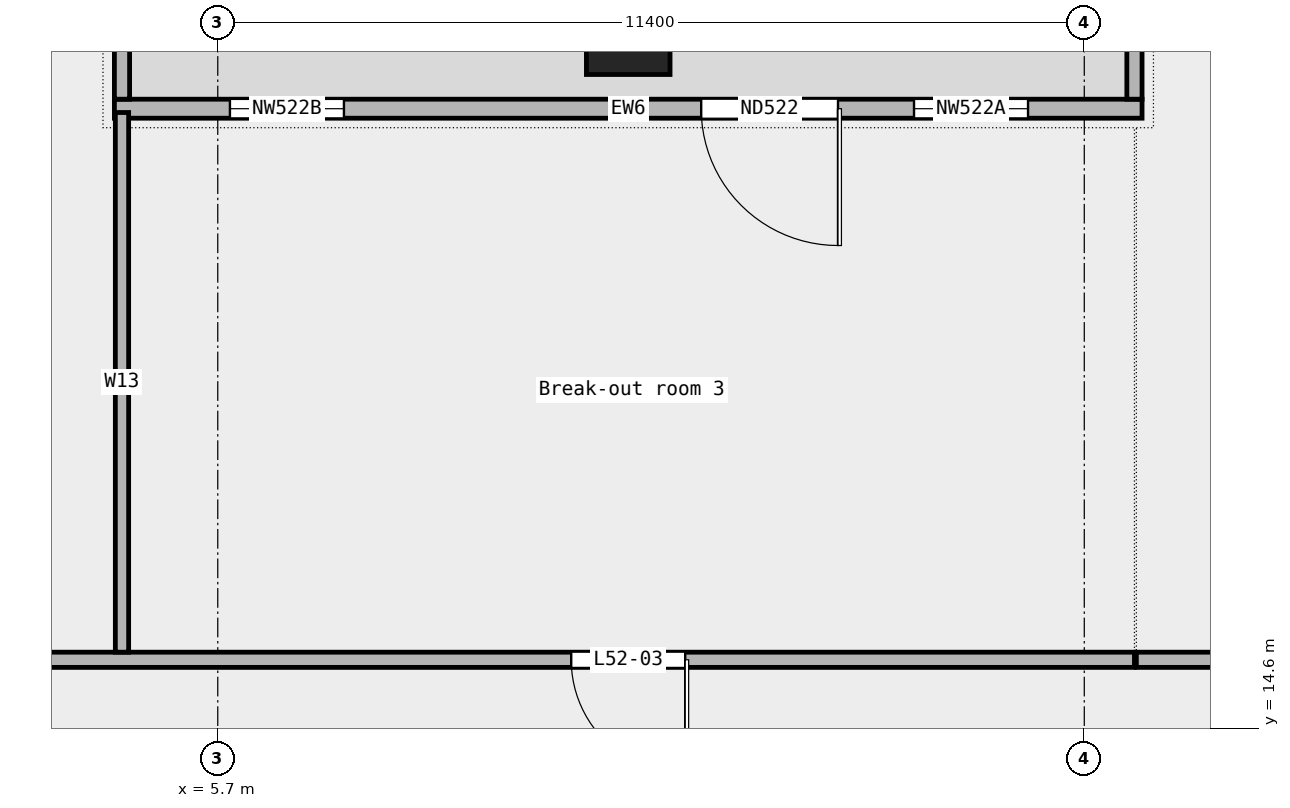
"""IFC4 building model, lengths in metres.
Left out: names, types, materials, properties, quantities, classifications, styles, units other than length and angle.
Written with IfcOpenShell. Run it as: python <this file> out.ifc"""

import sys

from ifc_helpers import new_model, si_unit, direction, frame, frame_2d, origin, origin_2d, place, context, subcontext, project, spatial, rectangle, extrude, element, fill, save


model = new_model("IFC4")
c1 = context("Model", 3, precision=1e-05, world=origin(), true_north=direction((0.0, 1.0)))
c2 = subcontext(c1, "Body", "Model", "MODEL_VIEW")
j1 = project(units=[si_unit("LENGTHUNIT", "METRE"), si_unit("PLANEANGLEUNIT", "RADIAN")], contexts=[c1])
p1 = place(None, origin())
s1 = spatial("IfcSite", under=j1, at=p1, CompositionType="ELEMENT")
p2 = place(p1, origin())
s2 = spatial("IfcBuilding", under=s1, at=p2, CompositionType="ELEMENT")
p3 = place(p2, frame((0.0, 0.0, 243.0)))
s3 = spatial("IfcBuildingStorey", under=s2, at=p3, CompositionType="ELEMENT", Elevation=243.0)
p4 = place(p3, frame((11.1, 23.75, 0.0), z_axis=(0.0, 0.0, 1.0), x_axis=(1.0, 0.0, 0.0)))
e1 = element("IfcColumn", 1, at=p4, inside=s3, PredefinedType="COLUMN", context=c2, shape_type="SweptSolid", body=[
    extrude(rectangle(XDim=1.1, YDim=1.1, at=origin_2d()), origin(), (0.0, 0.0, 1.0), 3.6),
])
p5 = place(p3, frame((17.86, 22.75, 0.0), z_axis=(0.0, 0.0, 1.0), x_axis=(-1.0, 0.0, 0.0)))
e2 = element("IfcWall", 2, at=p5, inside=s3, PredefinedType="STANDARD", context=c2, shape_type="SweptSolid", body=[
    extrude(rectangle(XDim=13.52, YDim=0.25, at=frame_2d((6.76, 0.0))), origin(), (0.0, 0.0, 1.0), 3.6),
])
p6 = place(p5, frame((1.5, 0.0, 0.45)))
e3 = element("IfcOpeningElement", 3, at=p6, cuts=e2, PredefinedType="OPENING", context=c2, shape_type="SweptSolid", body=[
    extrude(rectangle(XDim=1.5, YDim=2.4, at=frame_2d((0.75, 1.2))), frame((0.0, 0.137, 0.0), z_axis=(0.0, -1.0, 0.0), x_axis=(1.0, 0.0, 0.0)), (0.0, 0.0, 1.0), 0.274),
])
p7 = place(p5, frame((4.0, 0.0, 0.0)))
e4 = element("IfcOpeningElement", 4, at=p7, cuts=e2, PredefinedType="OPENING", context=c2, shape_type="SweptSolid", body=[
    extrude(rectangle(XDim=1.8, YDim=2.4, at=frame_2d((0.9, 1.2))), frame((0.0, 0.137, 0.0), z_axis=(0.0, -1.0, 0.0), x_axis=(1.0, 0.0, 0.0)), (0.0, 0.0, 1.0), 0.274),
])
p8 = place(p5, frame((10.5, 0.0, 0.45)))
e5 = element("IfcOpeningElement", 5, at=p8, cuts=e2, PredefinedType="OPENING", context=c2, shape_type="SweptSolid", body=[
    extrude(rectangle(XDim=1.5, YDim=2.4, at=frame_2d((0.75, 1.2))), frame((0.0, 0.137, 0.0), z_axis=(0.0, -1.0, 0.0), x_axis=(1.0, 0.0, 0.0)), (0.0, 0.0, 1.0), 0.274),
])
for number, where, z_axis, x_axis in (
    (6, (17.76, 24.75, 0.0), (0.0, 0.0, 1.0), (0.0, -1.0, 0.0)),
    (7, (4.44, 24.75, 0.0), (0.0, 0.0, 1.0), (0.0, -1.0, 0.0)),
):
    element("IfcWall", number, at=place(p3, frame(where, z_axis=z_axis, x_axis=x_axis)), inside=s3, PredefinedType="STANDARD", context=c2, shape_type="SweptSolid", body=[
        extrude(rectangle(XDim=1.875, YDim=0.2, at=frame_2d((0.938, 0.0))), origin(), (0.0, 0.0, 1.0), 3.6),
    ])
p9 = place(p3, frame((-28.15, 15.5, 0.0), z_axis=(0.0, 0.0, 1.0), x_axis=(1.0, 0.0, 0.0)))
e8 = element("IfcWall", 8, at=p9, inside=s3, PredefinedType="PARTITIONING", context=c2, shape_type="SweptSolid", body=[
    extrude(rectangle(XDim=45.91, YDim=0.2, at=frame_2d((22.955, 0.0))), origin(), (0.0, 0.0, 1.0), 3.6),
])
p10 = place(p9, frame((38.5, 0.0, 0.0)))
e9 = element("IfcOpeningElement", 9, at=p10, cuts=e8, PredefinedType="OPENING", context=c2, shape_type="SweptSolid", body=[
    extrude(rectangle(XDim=1.5, YDim=2.1, at=frame_2d((0.75, 1.05))), frame((0.0, 0.112, 0.0), z_axis=(0.0, -1.0, 0.0), x_axis=(1.0, 0.0, 0.0)), (0.0, 0.0, 1.0), 0.224),
])
p11 = place(p9, frame((9.462, 0.0, 0.0)))
e10 = element("IfcOpeningElement", 10, at=p11, cuts=e8, PredefinedType="OPENING", context=c2, shape_type="SweptSolid", body=[
    extrude(rectangle(XDim=1.8, YDim=2.1, at=frame_2d((0.9, 1.05))), frame((0.0, 0.112, 0.0), z_axis=(0.0, -1.0, 0.0), x_axis=(1.0, 0.0, 0.0)), (0.0, 0.0, 1.0), 0.224),
])
p12 = place(p9, frame((25.808, 0.0, 0.0)))
e11 = element("IfcOpeningElement", 11, at=p12, cuts=e8, PredefinedType="OPENING", context=c2, shape_type="SweptSolid", body=[
    extrude(rectangle(XDim=1.5, YDim=2.1, at=frame_2d((0.75, 1.05))), frame((0.0, 0.112, 0.0), z_axis=(0.0, -1.0, 0.0), x_axis=(1.0, 0.0, 0.0)), (0.0, 0.0, 1.0), 0.224),
])
p13 = place(p3, frame((17.785, 15.5, 0.0), z_axis=(0.0, 0.0, 1.0), x_axis=(1.0, 0.0, 0.0)))
e12 = element("IfcWall", 12, at=p13, inside=s3, PredefinedType="PARTITIONING", context=c2, shape_type="SweptSolid", body=[
    extrude(rectangle(XDim=10.365, YDim=0.2, at=frame_2d((5.183, 0.0))), origin(), (0.0, 0.0, 1.0), 3.6),
])
p14 = place(p13, frame((4.482, 0.0, 0.0)))
e13 = element("IfcOpeningElement", 13, at=p14, cuts=e12, PredefinedType="OPENING", context=c2, shape_type="SweptSolid", body=[
    extrude(rectangle(XDim=1.2, YDim=2.1, at=frame_2d((0.6, 1.05))), frame((0.0, 0.112, 0.0), z_axis=(0.0, -1.0, 0.0), x_axis=(1.0, 0.0, 0.0)), (0.0, 0.0, 1.0), 0.224),
])
p15 = place(p3, frame((4.44, 15.6, 0.0), z_axis=(0.0, 0.0, 1.0), x_axis=(0.0, 1.0, 0.0)))
e14 = element("IfcWall", 14, at=p15, inside=s3, PredefinedType="PARTITIONING", context=c2, shape_type="SweptSolid", body=[
    extrude(rectangle(XDim=7.1, YDim=0.175, at=frame_2d((3.55, 0.0))), origin(), (0.0, 0.0, 1.0), 3.6),
])
p16 = place(p6, origin())
e15 = element("IfcWindow", 15, at=p16, inside=s3, PartitioningType="SINGLE_PANEL", PredefinedType="WINDOW", context=c2, shape_type="SweptSolid", body=[
    extrude(rectangle(XDim=1.5, YDim=2.4, at=frame_2d((0.75, 1.2))), frame((0.0, 0.03, 0.0), z_axis=(0.0, -1.0, 0.0), x_axis=(1.0, 0.0, 0.0)), (0.0, 0.0, 1.0), 0.06),
])
fill(e3, e15)
p17 = place(p7, origin())
e16 = element("IfcDoor", 16, at=p17, inside=s3, OperationType="DOUBLE_DOOR_SINGLE_SWING", PredefinedType="DOOR", context=c2, shape_type="SweptSolid", body=[
    extrude(rectangle(XDim=1.8, YDim=2.4, at=frame_2d((0.9, 1.2))), frame((0.0, 0.025, 0.0), z_axis=(0.0, -1.0, 0.0), x_axis=(1.0, 0.0, 0.0)), (0.0, 0.0, 1.0), 0.05),
])
fill(e4, e16)
p18 = place(p8, origin())
e17 = element("IfcWindow", 17, at=p18, inside=s3, PartitioningType="SINGLE_PANEL", PredefinedType="WINDOW", context=c2, shape_type="SweptSolid", body=[
    extrude(rectangle(XDim=1.5, YDim=2.4, at=frame_2d((0.75, 1.2))), frame((0.0, 0.03, 0.0), z_axis=(0.0, -1.0, 0.0), x_axis=(1.0, 0.0, 0.0)), (0.0, 0.0, 1.0), 0.06),
])
fill(e5, e17)
p19 = place(p10, origin())
e18 = element("IfcDoor", 18, at=p19, inside=s3, OperationType="DOUBLE_DOOR_SINGLE_SWING", PredefinedType="DOOR", context=c2, shape_type="SweptSolid", body=[
    extrude(rectangle(XDim=1.5, YDim=2.1, at=frame_2d((0.75, 1.05))), frame((0.0, 0.025, 0.0), z_axis=(0.0, -1.0, 0.0), x_axis=(1.0, 0.0, 0.0)), (0.0, 0.0, 1.0), 0.05),
])
fill(e9, e18)
save(model, sys.argv[1])
